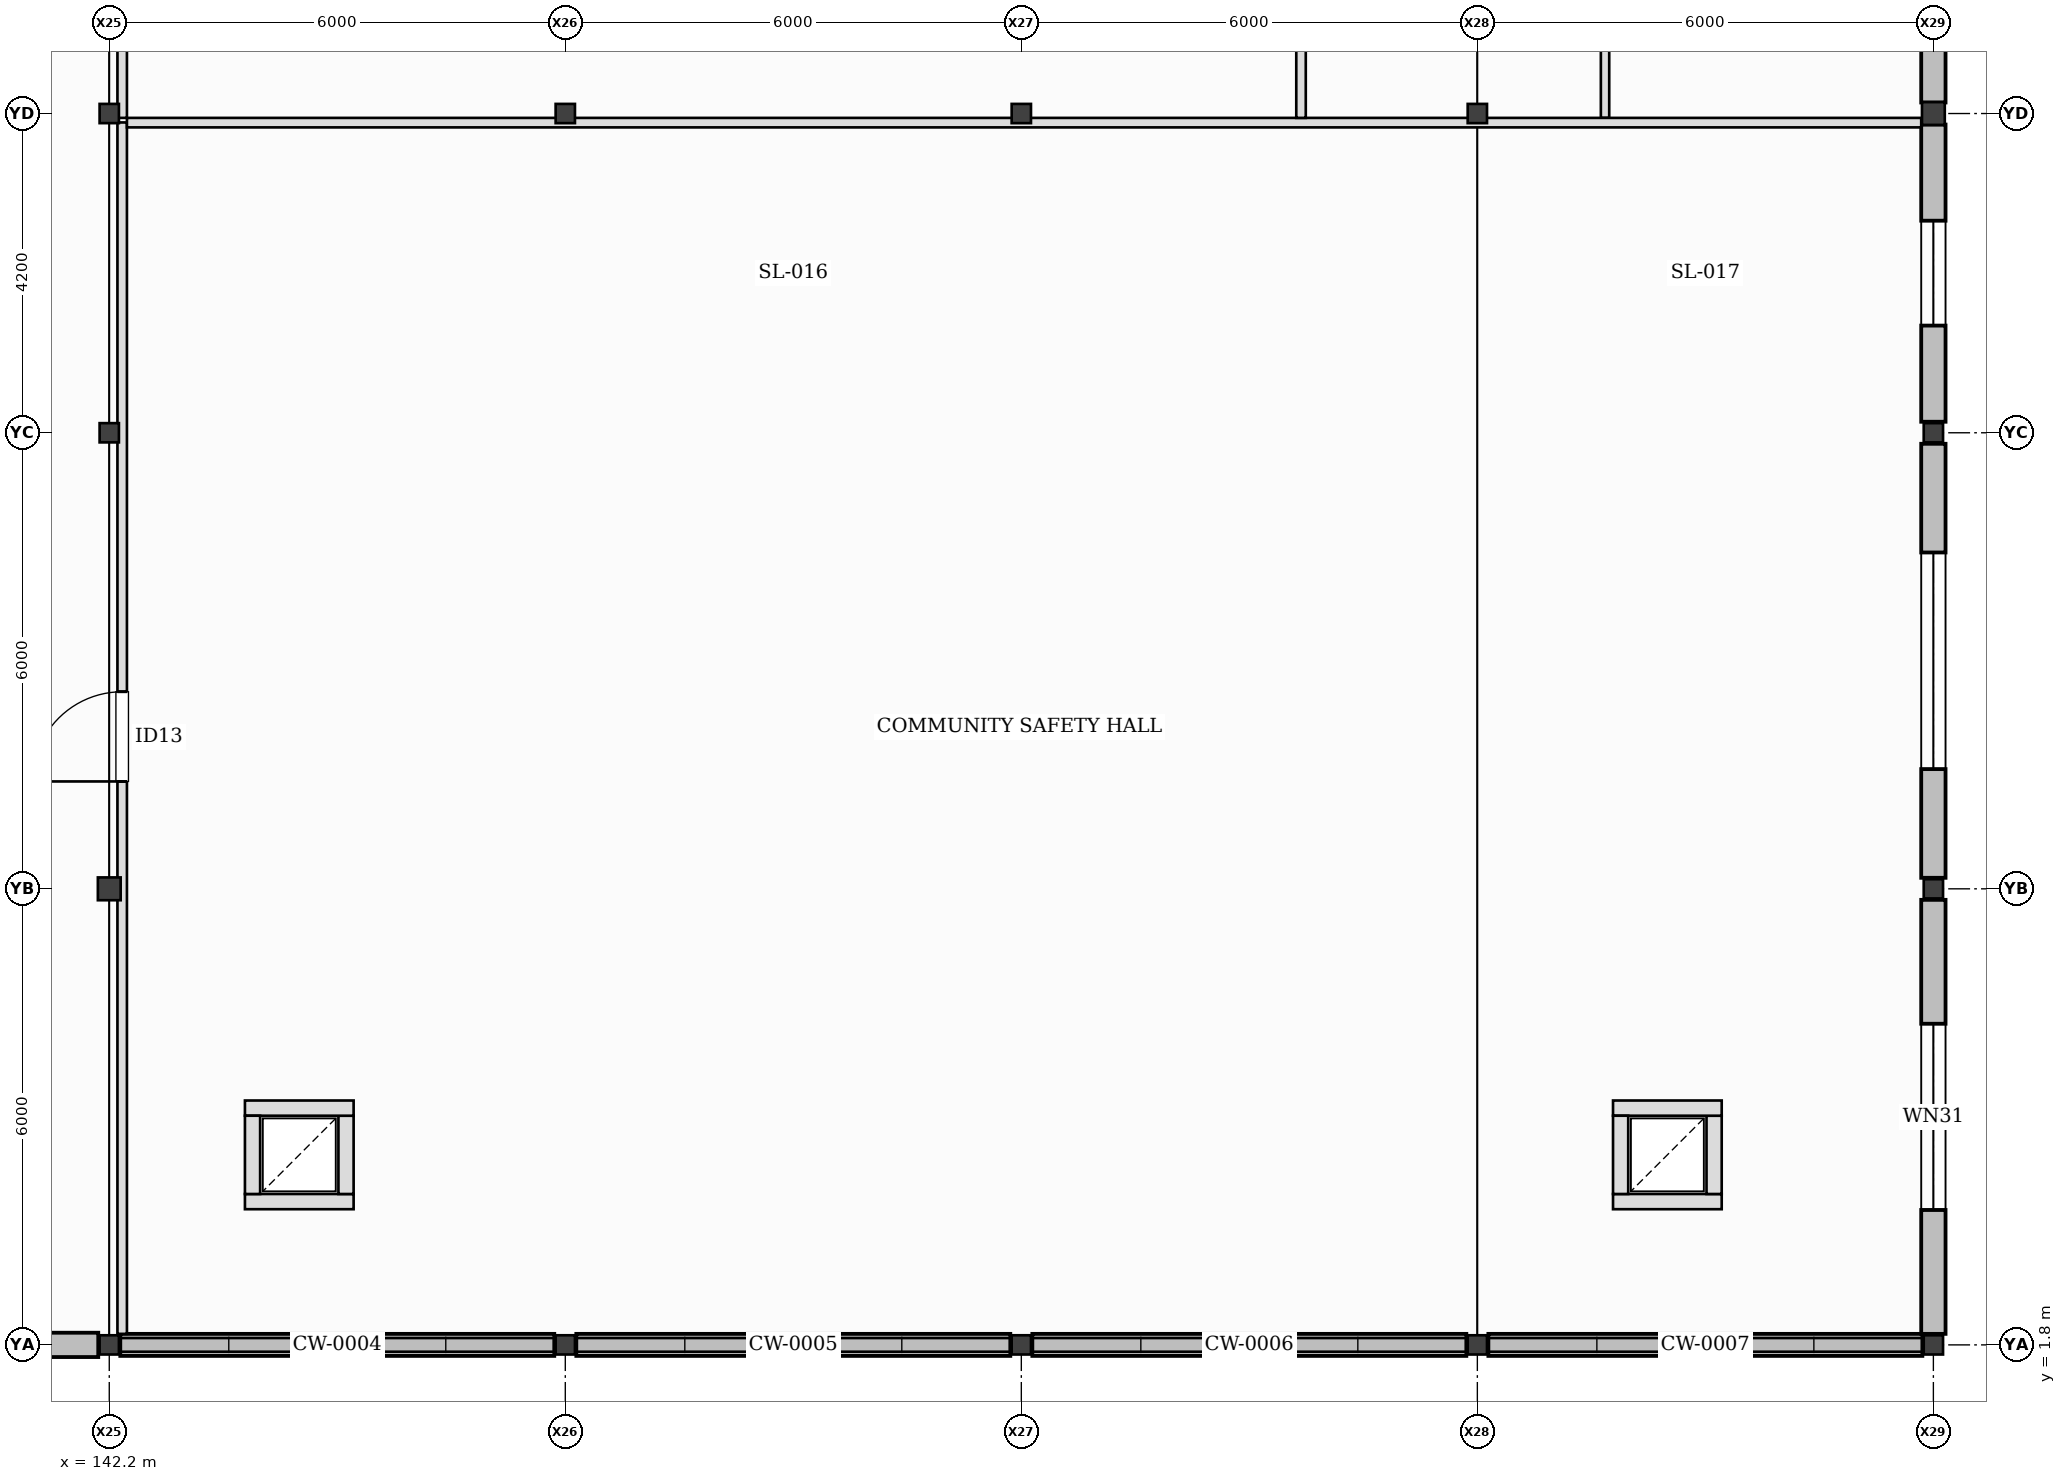
"""IFC4 building model, lengths in metres.
Left out: names, types, materials, properties, quantities, classifications, styles, units other than length and angle.
Written with IfcOpenShell. Run it as: python <this file> out.ifc"""

import sys

from ifc_helpers import new_model, si_unit, direction, frame, frame_2d, origin, origin_2d, place, context, subcontext, project, spatial, rectangle, hollow_rectangle, i_section, extrude, element, fill, save


model = new_model("IFC4")
c1 = context("Model", 3, precision=1e-05, world=origin(), true_north=direction((0.0, 1.0)))
c2 = subcontext(c1, "Body", "Model", "MODEL_VIEW")
j1 = project(units=[si_unit("LENGTHUNIT", "METRE"), si_unit("PLANEANGLEUNIT", "RADIAN")], contexts=[c1])
p1 = place(None, origin())
s1 = spatial("IfcSite", under=j1, at=p1, CompositionType="ELEMENT")
p2 = place(p1, origin())
s2 = spatial("IfcBuilding", under=s1, at=p2, CompositionType="ELEMENT")
p3 = place(p2, origin())
s3 = spatial("IfcBuildingStorey", under=s2, at=p3, CompositionType="ELEMENT", Elevation=0.0)
p4 = place(p3, frame((142.2, 1.8, -0.41), z_axis=(0.0, 0.0, 1.0), x_axis=(1.0, 0.0, 0.0)))
e1 = element("IfcColumn", 1, at=p4, inside=s3, PredefinedType="COLUMN", context=c2, shape_type="SweptSolid", body=[
    extrude(i_section(OverallWidth=0.254, OverallDepth=0.253, WebThickness=0.009, FlangeThickness=0.014, at=origin_2d()), origin(), (0.0, 0.0, 1.0), 6.41),
])
p5 = place(p3, frame((142.2, 7.8, -0.41), z_axis=(0.0, 0.0, 1.0), x_axis=(1.0, 0.0, 0.0)))
e2 = element("IfcColumn", 2, at=p5, inside=s3, PredefinedType="COLUMN", context=c2, shape_type="SweptSolid", body=[
    extrude(hollow_rectangle(XDim=0.3, YDim=0.3, WallThickness=0.012, at=origin_2d()), origin(), (0.0, 0.0, 1.0), 6.41),
])
for number, where, z_axis, x_axis in (
    (3, (142.2, 13.8, -0.41), (0.0, 0.0, 1.0), (1.0, 0.0, 0.0)),
    (4, (142.2, 18.0, -0.41), (0.0, 0.0, 1.0), (1.0, 0.0, 0.0)),
    (5, (148.2, 1.8, -0.41), (0.0, 0.0, 1.0), (1.0, 0.0, 0.0)),
    (6, (148.2, 18.0, -0.41), (0.0, 0.0, 1.0), (1.0, 0.0, 0.0)),
    (7, (154.2, 1.8, -0.41), (0.0, 0.0, 1.0), (1.0, 0.0, 0.0)),
    (8, (154.2, 18.0, -0.41), (0.0, 0.0, 1.0), (1.0, 0.0, 0.0)),
    (9, (160.2, 1.8, -0.41), (0.0, 0.0, 1.0), (1.0, 0.0, 0.0)),
    (10, (160.2, 18.0, -0.41), (0.0, 0.0, 1.0), (1.0, 0.0, 0.0)),
    (11, (166.2, 1.8, -0.41), (0.0, 0.0, 1.0), (1.0, 0.0, 0.0)),
    (12, (166.2, 7.8, -0.41), (0.0, 0.0, 1.0), (1.0, 0.0, 0.0)),
    (13, (166.2, 13.8, -0.41), (0.0, 0.0, 1.0), (1.0, 0.0, 0.0)),
):
    element("IfcColumn", number, at=place(p3, frame(where, z_axis=z_axis, x_axis=x_axis)), inside=s3, PredefinedType="COLUMN", context=c2, shape_type="SweptSolid", body=[
        extrude(i_section(OverallWidth=0.254, OverallDepth=0.253, WebThickness=0.009, FlangeThickness=0.014, at=origin_2d()), origin(), (0.0, 0.0, 1.0), 6.41),
    ])
p6 = place(p3, frame((166.2, 18.0, -0.41), z_axis=(0.0, 0.0, 1.0), x_axis=(1.0, 0.0, 0.0)))
e14 = element("IfcColumn", 14, at=p6, inside=s3, PredefinedType="COLUMN", context=c2, shape_type="SweptSolid", body=[
    extrude(hollow_rectangle(XDim=0.3, YDim=0.3, WallThickness=0.012, at=origin_2d()), origin(), (0.0, 0.0, 1.0), 6.41),
])
p7 = place(p3, frame((136.345, 1.8, 0.0), z_axis=(0.0, 0.0, 1.0), x_axis=(1.0, 0.0, 0.0)))
e15 = element("IfcWall", 15, at=p7, inside=s3, PredefinedType="STANDARD", context=c2, shape_type="SweptSolid", body=[
    extrude(rectangle(XDim=5.71, YDim=0.32, at=frame_2d((2.855, 0.0))), origin(), (0.0, 0.0, 1.0), 5.035),
])
p8 = place(p7, frame((2.052, 0.0, 0.0)))
e16 = element("IfcOpeningElement", 16, at=p8, cuts=e15, PredefinedType="OPENING", context=c2, shape_type="SweptSolid", body=[
    extrude(rectangle(XDim=1.95, YDim=2.35, at=frame_2d((0.975, 1.175))), frame((0.0, 0.17, 0.0), z_axis=(0.0, -1.0, 0.0), x_axis=(1.0, 0.0, 0.0)), (0.0, 0.0, 1.0), 0.34),
])
p9 = place(p3, frame((142.345, 1.8, 0.0), z_axis=(0.0, 0.0, 1.0), x_axis=(1.0, 0.0, 0.0)))
e17 = element("IfcWall", 17, at=p9, inside=s3, PredefinedType="STANDARD", context=c2, shape_type="SweptSolid", body=[
    extrude(rectangle(XDim=5.71, YDim=0.29, at=frame_2d((2.855, 0.0))), origin(), (0.0, 0.0, 1.0), 0.32),
])
p10 = place(p3, frame((148.345, 1.8, 0.0), z_axis=(0.0, 0.0, 1.0), x_axis=(1.0, 0.0, 0.0)))
e18 = element("IfcWall", 18, at=p10, inside=s3, PredefinedType="STANDARD", context=c2, shape_type="SweptSolid", body=[
    extrude(rectangle(XDim=5.71, YDim=0.29, at=frame_2d((2.855, 0.0))), origin(), (0.0, 0.0, 1.0), 0.44),
])
p11 = place(p3, frame((154.345, 1.8, 0.0), z_axis=(0.0, 0.0, 1.0), x_axis=(1.0, 0.0, 0.0)))
e19 = element("IfcWall", 19, at=p11, inside=s3, PredefinedType="STANDARD", context=c2, shape_type="SweptSolid", body=[
    extrude(rectangle(XDim=5.71, YDim=0.29, at=frame_2d((2.855, 0.0))), origin(), (0.0, 0.0, 1.0), 0.56),
])
p12 = place(p3, frame((160.345, 1.8, 0.0), z_axis=(0.0, 0.0, 1.0), x_axis=(1.0, 0.0, 0.0)))
e20 = element("IfcWall", 20, at=p12, inside=s3, PredefinedType="STANDARD", context=c2, shape_type="SweptSolid", body=[
    extrude(rectangle(XDim=5.71, YDim=0.29, at=frame_2d((2.855, 0.0))), origin(), (0.0, 0.0, 1.0), 0.68),
])
p13 = place(p3, frame((166.2, 1.945, 0.0), z_axis=(0.0, 0.0, 1.0), x_axis=(0.0, 1.0, 0.0)))
e21 = element("IfcWall", 21, at=p13, inside=s3, PredefinedType="STANDARD", context=c2, shape_type="SweptSolid", body=[
    extrude(rectangle(XDim=5.71, YDim=0.32, at=frame_2d((2.855, 0.0))), origin(), (0.0, 0.0, 1.0), 5.044),
])
p14 = place(p13, frame((1.63, 0.0, 1.0)))
e22 = element("IfcOpeningElement", 22, at=p14, cuts=e21, PredefinedType="OPENING", context=c2, shape_type="SweptSolid", body=[
    extrude(rectangle(XDim=2.45, YDim=1.08, at=frame_2d((1.225, 0.54))), frame((0.0, 0.17, 0.0), z_axis=(0.0, -1.0, 0.0), x_axis=(1.0, 0.0, 0.0)), (0.0, 0.0, 1.0), 0.34),
])
p15 = place(p3, frame((166.2, 7.945, 0.0), z_axis=(0.0, 0.0, 1.0), x_axis=(0.0, 1.0, 0.0)))
e23 = element("IfcWall", 23, at=p15, inside=s3, PredefinedType="STANDARD", context=c2, shape_type="SweptSolid", body=[
    extrude(rectangle(XDim=5.71, YDim=0.32, at=frame_2d((2.855, 0.0))), origin(), (0.0, 0.0, 1.0), 5.044),
])
p16 = place(p15, frame((1.43, 0.0, 1.0)))
e24 = element("IfcOpeningElement", 24, at=p16, cuts=e23, PredefinedType="OPENING", context=c2, shape_type="SweptSolid", body=[
    extrude(rectangle(XDim=2.85, YDim=1.08, at=frame_2d((1.425, 0.54))), frame((0.0, 0.17, 0.0), z_axis=(0.0, -1.0, 0.0), x_axis=(1.0, 0.0, 0.0)), (0.0, 0.0, 1.0), 0.34),
])
p17 = place(p3, frame((166.2, 13.945, 0.0), z_axis=(0.0, 0.0, 1.0), x_axis=(0.0, 1.0, 0.0)))
e25 = element("IfcWall", 25, at=p17, inside=s3, PredefinedType="STANDARD", context=c2, shape_type="SweptSolid", body=[
    extrude(rectangle(XDim=3.91, YDim=0.32, at=frame_2d((1.955, 0.0))), origin(), (0.0, 0.0, 1.0), 5.044),
])
p18 = place(p17, frame((1.265, 0.0, 1.0)))
e26 = element("IfcOpeningElement", 26, at=p18, cuts=e25, PredefinedType="OPENING", context=c2, shape_type="SweptSolid", body=[
    extrude(rectangle(XDim=1.38, YDim=1.38, at=frame_2d((0.69, 0.69))), frame((0.0, 0.17, 0.0), z_axis=(0.0, -1.0, 0.0), x_axis=(1.0, 0.0, 0.0)), (0.0, 0.0, 1.0), 0.34),
])
p19 = place(p3, frame((166.2, 18.145, 0.0), z_axis=(0.0, 0.0, 1.0), x_axis=(0.0, 1.0, 0.0)))
e27 = element("IfcWall", 27, at=p19, inside=s3, PredefinedType="STANDARD", context=c2, shape_type="SweptSolid", body=[
    extrude(rectangle(XDim=5.71, YDim=0.32, at=frame_2d((2.855, 0.0))), origin(), (0.0, 0.0, 1.0), 5.044),
])
p20 = place(p19, frame((1.03, 0.0, 1.0)))
e28 = element("IfcOpeningElement", 28, at=p20, cuts=e27, PredefinedType="OPENING", context=c2, shape_type="SweptSolid", body=[
    extrude(rectangle(XDim=3.65, YDim=1.08, at=frame_2d((1.825, 0.54))), frame((0.0, 0.17, 0.0), z_axis=(0.0, -1.0, 0.0), x_axis=(1.0, 0.0, 0.0)), (0.0, 0.0, 1.0), 0.34),
])
p21 = place(p3, frame((143.985, 3.685, 0.0), z_axis=(0.0, 0.0, 1.0), x_axis=(1.0, 0.0, 0.0)))
e29 = element("IfcWall", 29, at=p21, inside=s3, PredefinedType="PARTITIONING", context=c2, shape_type="SweptSolid", body=[
    extrude(rectangle(XDim=1.43, YDim=0.2, at=frame_2d((0.715, 0.0))), origin(), (0.0, 0.0, 1.0), 5.68),
])
p22 = place(p3, frame((145.315, 3.785, 0.0), z_axis=(0.0, 0.0, 1.0), x_axis=(0.0, 1.0, 0.0)))
e30 = element("IfcWall", 30, at=p22, inside=s3, PredefinedType="PARTITIONING", context=c2, shape_type="SweptSolid", body=[
    extrude(rectangle(XDim=1.03, YDim=0.2, at=frame_2d((0.515, 0.0))), origin(), (0.0, 0.0, 1.0), 5.68),
])
p23 = place(p3, frame((145.415, 4.915, 0.0), z_axis=(0.0, 0.0, 1.0), x_axis=(-1.0, 0.0, 0.0)))
e31 = element("IfcWall", 31, at=p23, inside=s3, PredefinedType="PARTITIONING", context=c2, shape_type="SweptSolid", body=[
    extrude(rectangle(XDim=1.43, YDim=0.2, at=frame_2d((0.715, 0.0))), origin(), (0.0, 0.0, 1.0), 5.68),
])
p24 = place(p3, frame((144.085, 4.815, 0.0), z_axis=(0.0, 0.0, 1.0), x_axis=(0.0, -1.0, 0.0)))
e32 = element("IfcWall", 32, at=p24, inside=s3, PredefinedType="PARTITIONING", context=c2, shape_type="SweptSolid", body=[
    extrude(rectangle(XDim=1.03, YDim=0.2, at=frame_2d((0.515, 0.0))), origin(), (0.0, 0.0, 1.0), 5.294),
])
p25 = place(p3, frame((161.985, 3.685, 0.0), z_axis=(0.0, 0.0, 1.0), x_axis=(1.0, 0.0, 0.0)))
e33 = element("IfcWall", 33, at=p25, inside=s3, PredefinedType="PARTITIONING", context=c2, shape_type="SweptSolid", body=[
    extrude(rectangle(XDim=1.43, YDim=0.2, at=frame_2d((0.715, 0.0))), origin(), (0.0, 0.0, 1.0), 5.68),
])
p26 = place(p3, frame((163.315, 3.785, 0.0), z_axis=(0.0, 0.0, 1.0), x_axis=(0.0, 1.0, 0.0)))
e34 = element("IfcWall", 34, at=p26, inside=s3, PredefinedType="PARTITIONING", context=c2, shape_type="SweptSolid", body=[
    extrude(rectangle(XDim=1.03, YDim=0.2, at=frame_2d((0.515, 0.0))), origin(), (0.0, 0.0, 1.0), 5.68),
])
p27 = place(p3, frame((163.415, 4.915, 0.0), z_axis=(0.0, 0.0, 1.0), x_axis=(-1.0, 0.0, 0.0)))
e35 = element("IfcWall", 35, at=p27, inside=s3, PredefinedType="PARTITIONING", context=c2, shape_type="SweptSolid", body=[
    extrude(rectangle(XDim=1.43, YDim=0.2, at=frame_2d((0.715, 0.0))), origin(), (0.0, 0.0, 1.0), 5.68),
])
p28 = place(p3, frame((162.085, 4.815, 0.0), z_axis=(0.0, 0.0, 1.0), x_axis=(0.0, -1.0, 0.0)))
e36 = element("IfcWall", 36, at=p28, inside=s3, PredefinedType="PARTITIONING", context=c2, shape_type="SweptSolid", body=[
    extrude(rectangle(XDim=1.03, YDim=0.2, at=frame_2d((0.515, 0.0))), origin(), (0.0, 0.0, 1.0), 5.339),
])
p29 = place(p3, frame((142.37, 1.945, 0.0), z_axis=(0.0, 0.0, 1.0), x_axis=(0.0, 1.0, 0.0)))
e37 = element("IfcWall", 37, at=p29, inside=s3, PredefinedType="PARTITIONING", context=c2, shape_type="SweptSolid", body=[
    extrude(rectangle(XDim=15.938, YDim=0.125, at=frame_2d((7.969, 0.0))), origin(), (0.0, 0.0, 1.0), 5.044),
])
p30 = place(p29, frame((7.268, 0.0, 0.0)))
e38 = element("IfcOpeningElement", 38, at=p30, cuts=e37, PredefinedType="OPENING", context=c2, shape_type="SweptSolid", body=[
    extrude(rectangle(XDim=1.18, YDim=2.16, at=frame_2d((0.59, 1.08))), frame((0.0, 0.073, 0.0), z_axis=(0.0, -1.0, 0.0), x_axis=(1.0, 0.0, 0.0)), (0.0, 0.0, 1.0), 0.145),
])
p31 = place(p3, frame((142.433, 17.88, 0.0), z_axis=(0.0, 0.0, 1.0), x_axis=(1.0, 0.0, 0.0)))
e39 = element("IfcWall", 39, at=p31, inside=s3, PredefinedType="PARTITIONING", context=c2, shape_type="SweptSolid", body=[
    extrude(rectangle(XDim=23.607, YDim=0.125, at=frame_2d((11.804, 0.0))), origin(), (0.0, 0.0, 1.0), 5.035),
])
p32 = place(p3, frame((142.37, 17.942, 0.0), z_axis=(0.0, 0.0, 1.0), x_axis=(0.0, 1.0, 0.0)))
e40 = element("IfcWall", 40, at=p32, inside=s3, PredefinedType="PARTITIONING", context=c2, shape_type="SweptSolid", body=[
    extrude(rectangle(XDim=6.22, YDim=0.125, at=frame_2d((3.11, 0.0))), origin(), (0.0, 0.0, 1.0), 5.044),
])
p33 = place(p32, frame((2.595, 0.0, 0.0)))
e41 = element("IfcOpeningElement", 41, at=p33, cuts=e40, PredefinedType="OPENING", context=c2, shape_type="SweptSolid", body=[
    extrude(rectangle(XDim=1.03, YDim=2.15, at=frame_2d((0.515, 1.075))), frame((0.0, 0.073, 0.0), z_axis=(0.0, -1.0, 0.0), x_axis=(1.0, 0.0, 0.0)), (0.0, 0.0, 1.0), 0.145),
])
p34 = place(p3, frame((157.88, 24.08, 0.0), z_axis=(0.0, 0.0, 1.0), x_axis=(0.0, -1.0, 0.0)))
e42 = element("IfcWall", 42, at=p34, inside=s3, PredefinedType="PARTITIONING", context=c2, shape_type="SweptSolid", body=[
    extrude(rectangle(XDim=6.138, YDim=0.125, at=frame_2d((3.069, 0.0))), origin(), (0.0, 0.0, 1.0), 5.339),
])
p35 = place(p3, frame((161.88, 24.08, 0.0), z_axis=(0.0, 0.0, 1.0), x_axis=(0.0, -1.0, 0.0)))
e43 = element("IfcWall", 43, at=p35, inside=s3, PredefinedType="PARTITIONING", context=c2, shape_type="SweptSolid", body=[
    extrude(rectangle(XDim=6.138, YDim=0.11, at=frame_2d((3.069, 0.0))), origin(), (0.0, 0.0, 1.0), 5.39),
])
p36 = place(p14, origin())
e44 = element("IfcWindow", 44, at=p36, inside=s3, PartitioningType="SINGLE_PANEL", PredefinedType="WINDOW", context=c2, shape_type="SweptSolid", body=[
    extrude(rectangle(XDim=2.45, YDim=1.08, at=frame_2d((1.225, 0.54))), frame((0.0, 0.03, 0.0), z_axis=(0.0, -1.0, 0.0), x_axis=(1.0, 0.0, 0.0)), (0.0, 0.0, 1.0), 0.06),
])
fill(e22, e44)
p37 = place(p16, origin())
e45 = element("IfcWindow", 45, at=p37, inside=s3, PartitioningType="SINGLE_PANEL", PredefinedType="WINDOW", context=c2, shape_type="SweptSolid", body=[
    extrude(rectangle(XDim=2.85, YDim=1.08, at=frame_2d((1.425, 0.54))), frame((0.0, 0.03, 0.0), z_axis=(0.0, -1.0, 0.0), x_axis=(1.0, 0.0, 0.0)), (0.0, 0.0, 1.0), 0.06),
])
fill(e24, e45)
p38 = place(p18, origin())
e46 = element("IfcWindow", 46, at=p38, inside=s3, PartitioningType="SINGLE_PANEL", PredefinedType="WINDOW", context=c2, shape_type="SweptSolid", body=[
    extrude(rectangle(XDim=1.38, YDim=1.38, at=frame_2d((0.69, 0.69))), frame((0.0, 0.03, 0.0), z_axis=(0.0, -1.0, 0.0), x_axis=(1.0, 0.0, 0.0)), (0.0, 0.0, 1.0), 0.06),
])
fill(e26, e46)
p39 = place(p30, origin())
e47 = element("IfcDoor", 47, at=p39, inside=s3, OperationType="SINGLE_SWING_LEFT", PredefinedType="DOOR", context=c2, shape_type="SweptSolid", body=[
    extrude(rectangle(XDim=1.18, YDim=2.16, at=frame_2d((0.59, 1.08))), frame((0.0, 0.025, 0.0), z_axis=(0.0, -1.0, 0.0), x_axis=(1.0, 0.0, 0.0)), (0.0, 0.0, 1.0), 0.05),
])
fill(e38, e47)
save(model, sys.argv[1])
